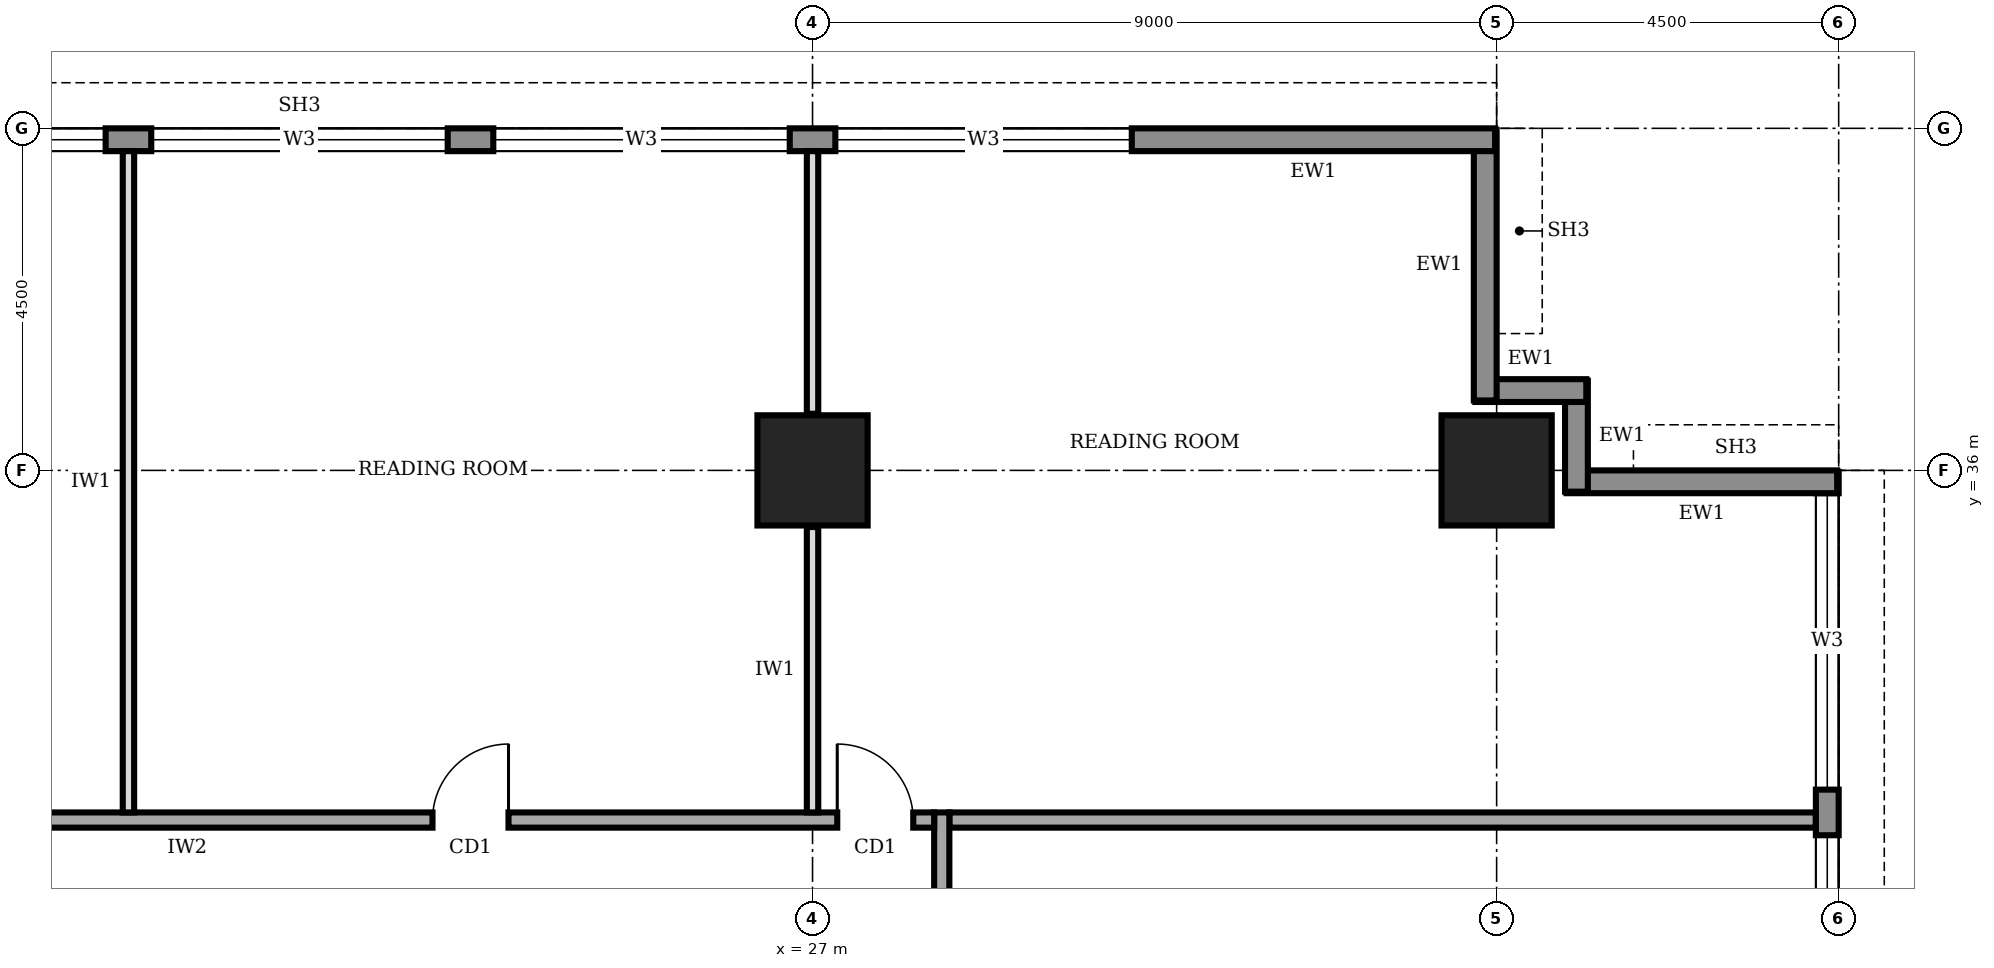
"""IFC4 building model, lengths in metres.
Left out: names, types, materials, properties, quantities, classifications, styles, units other than length and angle.
Written with IfcOpenShell. Run it as: python <this file> out.ifc"""

import sys

from ifc_helpers import new_model, si_unit, direction, frame, frame_2d, origin, origin_2d, place, context, subcontext, project, spatial, rectangle, extrude, element, fill, save


model = new_model("IFC4")
c1 = context("Model", 3, precision=1e-05, world=origin(), true_north=direction((0.0, 1.0)))
c2 = subcontext(c1, "Body", "Model", "MODEL_VIEW")
j1 = project(units=[si_unit("LENGTHUNIT", "METRE"), si_unit("PLANEANGLEUNIT", "RADIAN")], contexts=[c1])
p1 = place(None, origin())
s1 = spatial("IfcSite", under=j1, at=p1, CompositionType="ELEMENT")
p2 = place(p1, origin())
s2 = spatial("IfcBuilding", under=s1, at=p2, CompositionType="ELEMENT")
p3 = place(p2, frame((0.0, 0.0, 265.0)))
s3 = spatial("IfcBuildingStorey", under=s2, at=p3, CompositionType="ELEMENT", Elevation=265.0)
for number, where, z_axis, x_axis in (
    (1, (27.0, 36.0, 0.0), (0.0, 0.0, 1.0), (1.0, 0.0, 0.0)),
    (2, (36.0, 36.0, 0.0), (0.0, 0.0, 1.0), (1.0, 0.0, 0.0)),
):
    element("IfcColumn", number, at=place(p3, frame(where, z_axis=z_axis, x_axis=x_axis)), inside=s3, PredefinedType="COLUMN", context=c2, shape_type="SweptSolid", body=[
        extrude(rectangle(XDim=1.45, YDim=1.45, at=origin_2d()), origin(), (0.0, 0.0, 1.0), 4.0),
    ])
p4 = place(p3, frame((40.35, 4.52, 0.0), z_axis=(0.0, 0.0, 1.0), x_axis=(0.0, 1.0, 0.0)))
e3 = element("IfcWall", 3, at=p4, inside=s3, PredefinedType="STANDARD", context=c2, shape_type="SweptSolid", body=[
    extrude(rectangle(XDim=31.46, YDim=0.3, at=frame_2d((15.73, 0.0))), origin(), (0.0, 0.0, 1.0), 3.75),
])
p5 = place(p4, frame((4.78, 0.0, 0.95)))
e4 = element("IfcOpeningElement", 4, at=p5, cuts=e3, PredefinedType="OPENING", context=c2, shape_type="SweptSolid", body=[
    extrude(rectangle(XDim=3.9, YDim=1.8, at=frame_2d((1.95, 0.9))), frame((0.0, 0.16, 0.0), z_axis=(0.0, -1.0, 0.0), x_axis=(1.0, 0.0, 0.0)), (0.0, 0.0, 1.0), 0.32),
])
p6 = place(p4, frame((9.28, 0.0, 0.95)))
e5 = element("IfcOpeningElement", 5, at=p6, cuts=e3, PredefinedType="OPENING", context=c2, shape_type="SweptSolid", body=[
    extrude(rectangle(XDim=3.9, YDim=1.8, at=frame_2d((1.95, 0.9))), frame((0.0, 0.16, 0.0), z_axis=(0.0, -1.0, 0.0), x_axis=(1.0, 0.0, 0.0)), (0.0, 0.0, 1.0), 0.32),
])
p7 = place(p4, frame((13.78, 0.0, 0.95)))
e6 = element("IfcOpeningElement", 6, at=p7, cuts=e3, PredefinedType="OPENING", context=c2, shape_type="SweptSolid", body=[
    extrude(rectangle(XDim=3.9, YDim=1.8, at=frame_2d((1.95, 0.9))), frame((0.0, 0.16, 0.0), z_axis=(0.0, -1.0, 0.0), x_axis=(1.0, 0.0, 0.0)), (0.0, 0.0, 1.0), 0.32),
])
p8 = place(p4, frame((18.28, 0.0, 0.95)))
e7 = element("IfcOpeningElement", 7, at=p8, cuts=e3, PredefinedType="OPENING", context=c2, shape_type="SweptSolid", body=[
    extrude(rectangle(XDim=3.9, YDim=1.8, at=frame_2d((1.95, 0.9))), frame((0.0, 0.16, 0.0), z_axis=(0.0, -1.0, 0.0), x_axis=(1.0, 0.0, 0.0)), (0.0, 0.0, 1.0), 0.32),
])
p9 = place(p4, frame((22.78, 0.0, 0.95)))
e8 = element("IfcOpeningElement", 8, at=p9, cuts=e3, PredefinedType="OPENING", context=c2, shape_type="SweptSolid", body=[
    extrude(rectangle(XDim=3.9, YDim=1.8, at=frame_2d((1.95, 0.9))), frame((0.0, 0.16, 0.0), z_axis=(0.0, -1.0, 0.0), x_axis=(1.0, 0.0, 0.0)), (0.0, 0.0, 1.0), 0.32),
])
p10 = place(p4, frame((27.28, 0.0, 0.95)))
e9 = element("IfcOpeningElement", 9, at=p10, cuts=e3, PredefinedType="OPENING", context=c2, shape_type="SweptSolid", body=[
    extrude(rectangle(XDim=3.9, YDim=1.8, at=frame_2d((1.95, 0.9))), frame((0.0, 0.16, 0.0), z_axis=(0.0, -1.0, 0.0), x_axis=(1.0, 0.0, 0.0)), (0.0, 0.0, 1.0), 0.32),
])
p11 = place(p3, frame((40.48, 35.85, 0.0), z_axis=(0.0, 0.0, 1.0), x_axis=(-1.0, 0.0, 0.0)))
e10 = element("IfcWall", 10, at=p11, inside=s3, PredefinedType="STANDARD", context=c2, shape_type="SweptSolid", body=[
    extrude(rectangle(XDim=3.56, YDim=0.3, at=frame_2d((1.78, 0.0))), origin(), (0.0, 0.0, 1.0), 2.85),
])
for number, where, z_axis, x_axis in (
    (11, (37.05, 35.72, 0.0), (0.0, 0.0, 1.0), (0.0, 1.0, 0.0)),
    (12, (37.18, 37.05, 0.0), (0.0, 0.0, 1.0), (-1.0, 0.0, 0.0)),
):
    element("IfcWall", number, at=place(p3, frame(where, z_axis=z_axis, x_axis=x_axis)), inside=s3, PredefinedType="STANDARD", context=c2, shape_type="SweptSolid", body=[
        extrude(rectangle(XDim=1.46, YDim=0.3, at=frame_2d((0.73, 0.0))), origin(), (0.0, 0.0, 1.0), 3.75),
    ])
p12 = place(p3, frame((35.85, 36.92, 0.0), z_axis=(0.0, 0.0, 1.0), x_axis=(0.0, 1.0, 0.0)))
e13 = element("IfcWall", 13, at=p12, inside=s3, PredefinedType="STANDARD", context=c2, shape_type="SweptSolid", body=[
    extrude(rectangle(XDim=3.56, YDim=0.3, at=frame_2d((1.78, 0.0))), origin(), (0.0, 0.0, 1.0), 2.85),
])
p13 = place(p3, frame((35.98, 40.35, 0.0), z_axis=(0.0, 0.0, 1.0), x_axis=(-1.0, 0.0, 0.0)))
e14 = element("IfcWall", 14, at=p13, inside=s3, PredefinedType="STANDARD", context=c2, shape_type="SweptSolid", body=[
    extrude(rectangle(XDim=31.46, YDim=0.3, at=frame_2d((15.73, 0.0))), origin(), (0.0, 0.0, 1.0), 3.75),
])
p14 = place(p13, frame((27.28, 0.0, 0.95)))
e15 = element("IfcOpeningElement", 15, at=p14, cuts=e14, PredefinedType="OPENING", context=c2, shape_type="SweptSolid", body=[
    extrude(rectangle(XDim=3.9, YDim=1.8, at=frame_2d((1.95, 0.9))), frame((0.0, 0.16, 0.0), z_axis=(0.0, -1.0, 0.0), x_axis=(1.0, 0.0, 0.0)), (0.0, 0.0, 1.0), 0.32),
])
p15 = place(p13, frame((22.78, 0.0, 0.95)))
e16 = element("IfcOpeningElement", 16, at=p15, cuts=e14, PredefinedType="OPENING", context=c2, shape_type="SweptSolid", body=[
    extrude(rectangle(XDim=3.9, YDim=1.8, at=frame_2d((1.95, 0.9))), frame((0.0, 0.16, 0.0), z_axis=(0.0, -1.0, 0.0), x_axis=(1.0, 0.0, 0.0)), (0.0, 0.0, 1.0), 0.32),
])
p16 = place(p13, frame((18.28, 0.0, 0.95)))
e17 = element("IfcOpeningElement", 17, at=p16, cuts=e14, PredefinedType="OPENING", context=c2, shape_type="SweptSolid", body=[
    extrude(rectangle(XDim=3.9, YDim=1.8, at=frame_2d((1.95, 0.9))), frame((0.0, 0.16, 0.0), z_axis=(0.0, -1.0, 0.0), x_axis=(1.0, 0.0, 0.0)), (0.0, 0.0, 1.0), 0.32),
])
p17 = place(p13, frame((13.78, 0.0, 0.95)))
e18 = element("IfcOpeningElement", 18, at=p17, cuts=e14, PredefinedType="OPENING", context=c2, shape_type="SweptSolid", body=[
    extrude(rectangle(XDim=3.9, YDim=1.8, at=frame_2d((1.95, 0.9))), frame((0.0, 0.16, 0.0), z_axis=(0.0, -1.0, 0.0), x_axis=(1.0, 0.0, 0.0)), (0.0, 0.0, 1.0), 0.32),
])
p18 = place(p13, frame((9.28, 0.0, 0.95)))
e19 = element("IfcOpeningElement", 19, at=p18, cuts=e14, PredefinedType="OPENING", context=c2, shape_type="SweptSolid", body=[
    extrude(rectangle(XDim=3.9, YDim=1.8, at=frame_2d((1.95, 0.9))), frame((0.0, 0.16, 0.0), z_axis=(0.0, -1.0, 0.0), x_axis=(1.0, 0.0, 0.0)), (0.0, 0.0, 1.0), 0.32),
])
p19 = place(p13, frame((4.78, 0.0, 0.95)))
e20 = element("IfcOpeningElement", 20, at=p19, cuts=e14, PredefinedType="OPENING", context=c2, shape_type="SweptSolid", body=[
    extrude(rectangle(XDim=3.9, YDim=1.8, at=frame_2d((1.95, 0.9))), frame((0.0, 0.16, 0.0), z_axis=(0.0, -1.0, 0.0), x_axis=(1.0, 0.0, 0.0)), (0.0, 0.0, 1.0), 0.32),
])
p20 = place(p3, frame((28.7, 7.7, 0.0), z_axis=(0.0, 0.0, 1.0), x_axis=(0.0, 1.0, 0.0)))
e21 = element("IfcWall", 21, at=p20, inside=s3, PredefinedType="SOLIDWALL", context=c2, shape_type="SweptSolid", body=[
    extrude(rectangle(XDim=23.8, YDim=0.2, at=frame_2d((11.9, 0.0))), origin(), (0.0, 0.0, 1.0), 3.75),
])
p21 = place(p20, frame((4.15, 0.0, 0.0)))
e22 = element("IfcOpeningElement", 22, at=p21, cuts=e21, PredefinedType="OPENING", context=c2, shape_type="SweptSolid", body=[
    extrude(rectangle(XDim=1.8, YDim=2.1, at=frame_2d((0.9, 1.05))), frame((0.0, 0.11, 0.0), z_axis=(0.0, -1.0, 0.0), x_axis=(1.0, 0.0, 0.0)), (0.0, 0.0, 1.0), 0.22),
])
p22 = place(p20, frame((16.35, 0.0, 0.0)))
e23 = element("IfcOpeningElement", 23, at=p22, cuts=e21, PredefinedType="OPENING", context=c2, shape_type="SweptSolid", body=[
    extrude(rectangle(XDim=1.4, YDim=2.1, at=frame_2d((0.7, 1.05))), frame((0.0, 0.11, 0.0), z_axis=(0.0, -1.0, 0.0), x_axis=(1.0, 0.0, 0.0)), (0.0, 0.0, 1.0), 0.22),
])
p23 = place(p3, frame((28.6, 31.4, 0.0), z_axis=(0.0, 0.0, 1.0), x_axis=(-1.0, 0.0, 0.0)))
e24 = element("IfcWall", 24, at=p23, inside=s3, PredefinedType="SOLIDWALL", context=c2, shape_type="SweptSolid", body=[
    extrude(rectangle(XDim=16.9, YDim=0.2, at=frame_2d((8.45, 0.0))), origin(), (0.0, 0.0, 1.0), 3.75),
])
p24 = place(p23, frame((13.05, 0.0, 0.0)))
e25 = element("IfcOpeningElement", 25, at=p24, cuts=e24, PredefinedType="OPENING", context=c2, shape_type="SweptSolid", body=[
    extrude(rectangle(XDim=1.4, YDim=2.1, at=frame_2d((0.7, 1.05))), frame((0.0, 0.11, 0.0), z_axis=(0.0, -1.0, 0.0), x_axis=(1.0, 0.0, 0.0)), (0.0, 0.0, 1.0), 0.22),
])
p25 = place(p23, frame((5.6, 0.0, 0.0)))
e26 = element("IfcOpeningElement", 26, at=p25, cuts=e24, PredefinedType="OPENING", context=c2, shape_type="SweptSolid", body=[
    extrude(rectangle(XDim=1.0, YDim=2.1, at=frame_2d((0.5, 1.05))), frame((0.0, 0.11, 0.0), z_axis=(0.0, -1.0, 0.0), x_axis=(1.0, 0.0, 0.0)), (0.0, 0.0, 1.0), 0.22),
])
p26 = place(p23, frame((0.275, 0.0, 0.0)))
e27 = element("IfcOpeningElement", 27, at=p26, cuts=e24, PredefinedType="OPENING", context=c2, shape_type="SweptSolid", body=[
    extrude(rectangle(XDim=1.0, YDim=2.1, at=frame_2d((0.5, 1.05))), frame((0.0, 0.11, 0.0), z_axis=(0.0, -1.0, 0.0), x_axis=(1.0, 0.0, 0.0)), (0.0, 0.0, 1.0), 0.22),
])
p27 = place(p3, frame((28.8, 31.4, 0.0), z_axis=(0.0, 0.0, 1.0), x_axis=(1.0, 0.0, 0.0)))
e28 = element("IfcWall", 28, at=p27, inside=s3, PredefinedType="SOLIDWALL", context=c2, shape_type="SweptSolid", body=[
    extrude(rectangle(XDim=11.4, YDim=0.2, at=frame_2d((5.7, 0.0))), origin(), (0.0, 0.0, 1.0), 3.75),
])
p28 = place(p3, frame((18.0, 31.5, 0.0), z_axis=(0.0, 0.0, 1.0), x_axis=(0.0, 1.0, 0.0)))
e29 = element("IfcWall", 29, at=p28, inside=s3, PredefinedType="PARTITIONING", context=c2, shape_type="SweptSolid", body=[
    extrude(rectangle(XDim=8.7, YDim=0.15, at=frame_2d((4.35, 0.0))), origin(), (0.0, 0.0, 1.0), 3.75),
])
p29 = place(p3, frame((27.0, 31.5, 0.0), z_axis=(0.0, 0.0, 1.0), x_axis=(0.0, 1.0, 0.0)))
e30 = element("IfcWall", 30, at=p29, inside=s3, PredefinedType="PARTITIONING", context=c2, shape_type="SweptSolid", body=[
    extrude(rectangle(XDim=3.755, YDim=0.15, at=frame_2d((1.877, 0.0))), origin(), (0.0, 0.0, 1.0), 2.85),
])
p30 = place(p3, frame((27.0, 36.745, 0.0), z_axis=(0.0, 0.0, 1.0), x_axis=(0.0, 1.0, 0.0)))
e31 = element("IfcWall", 31, at=p30, inside=s3, PredefinedType="PARTITIONING", context=c2, shape_type="SweptSolid", body=[
    extrude(rectangle(XDim=3.455, YDim=0.15, at=frame_2d((1.728, 0.0))), origin(), (0.0, 0.0, 1.0), 2.85),
])
p31 = place(p9, origin())
e32 = element("IfcWindow", 32, at=p31, inside=s3, PartitioningType="SINGLE_PANEL", PredefinedType="WINDOW", context=c2, shape_type="SweptSolid", body=[
    extrude(rectangle(XDim=3.9, YDim=1.8, at=frame_2d((1.95, 0.9))), frame((0.0, 0.03, 0.0), z_axis=(0.0, -1.0, 0.0), x_axis=(1.0, 0.0, 0.0)), (0.0, 0.0, 1.0), 0.06),
])
fill(e8, e32)
p32 = place(p10, origin())
e33 = element("IfcWindow", 33, at=p32, inside=s3, PartitioningType="SINGLE_PANEL", PredefinedType="WINDOW", context=c2, shape_type="SweptSolid", body=[
    extrude(rectangle(XDim=3.9, YDim=1.8, at=frame_2d((1.95, 0.9))), frame((0.0, 0.03, 0.0), z_axis=(0.0, -1.0, 0.0), x_axis=(1.0, 0.0, 0.0)), (0.0, 0.0, 1.0), 0.06),
])
fill(e9, e33)
p33 = place(p16, origin())
e34 = element("IfcWindow", 34, at=p33, inside=s3, PartitioningType="SINGLE_PANEL", PredefinedType="WINDOW", context=c2, shape_type="SweptSolid", body=[
    extrude(rectangle(XDim=3.9, YDim=1.8, at=frame_2d((1.95, 0.9))), frame((0.0, 0.03, 0.0), z_axis=(0.0, -1.0, 0.0), x_axis=(1.0, 0.0, 0.0)), (0.0, 0.0, 1.0), 0.06),
])
fill(e17, e34)
p34 = place(p17, origin())
e35 = element("IfcWindow", 35, at=p34, inside=s3, PartitioningType="SINGLE_PANEL", PredefinedType="WINDOW", context=c2, shape_type="SweptSolid", body=[
    extrude(rectangle(XDim=3.9, YDim=1.8, at=frame_2d((1.95, 0.9))), frame((0.0, 0.03, 0.0), z_axis=(0.0, -1.0, 0.0), x_axis=(1.0, 0.0, 0.0)), (0.0, 0.0, 1.0), 0.06),
])
fill(e18, e35)
p35 = place(p18, origin())
e36 = element("IfcWindow", 36, at=p35, inside=s3, PartitioningType="SINGLE_PANEL", PredefinedType="WINDOW", context=c2, shape_type="SweptSolid", body=[
    extrude(rectangle(XDim=3.9, YDim=1.8, at=frame_2d((1.95, 0.9))), frame((0.0, 0.03, 0.0), z_axis=(0.0, -1.0, 0.0), x_axis=(1.0, 0.0, 0.0)), (0.0, 0.0, 1.0), 0.06),
])
fill(e19, e36)
p36 = place(p19, origin())
e37 = element("IfcWindow", 37, at=p36, inside=s3, PartitioningType="SINGLE_PANEL", PredefinedType="WINDOW", context=c2, shape_type="SweptSolid", body=[
    extrude(rectangle(XDim=3.9, YDim=1.8, at=frame_2d((1.95, 0.9))), frame((0.0, 0.03, 0.0), z_axis=(0.0, -1.0, 0.0), x_axis=(1.0, 0.0, 0.0)), (0.0, 0.0, 1.0), 0.06),
])
fill(e20, e37)
p37 = place(p25, frame((1.0, 0.0, 0.0), z_axis=(0.0, 0.0, 1.0), x_axis=(-1.0, 0.0, 0.0)))
e38 = element("IfcDoor", 38, at=p37, inside=s3, OperationType="SINGLE_SWING_RIGHT", PredefinedType="DOOR", context=c2, shape_type="SweptSolid", body=[
    extrude(rectangle(XDim=1.0, YDim=2.1, at=frame_2d((0.5, 1.05))), frame((0.0, 0.025, 0.0), z_axis=(0.0, -1.0, 0.0), x_axis=(1.0, 0.0, 0.0)), (0.0, 0.0, 1.0), 0.05),
])
fill(e26, e38)
p38 = place(p26, frame((1.0, 0.0, 0.0), z_axis=(0.0, 0.0, 1.0), x_axis=(-1.0, 0.0, 0.0)))
e39 = element("IfcDoor", 39, at=p38, inside=s3, OperationType="SINGLE_SWING_LEFT", PredefinedType="DOOR", context=c2, shape_type="SweptSolid", body=[
    extrude(rectangle(XDim=1.0, YDim=2.1, at=frame_2d((0.5, 1.05))), frame((0.0, 0.025, 0.0), z_axis=(0.0, -1.0, 0.0), x_axis=(1.0, 0.0, 0.0)), (0.0, 0.0, 1.0), 0.05),
])
fill(e27, e39)
save(model, sys.argv[1])
